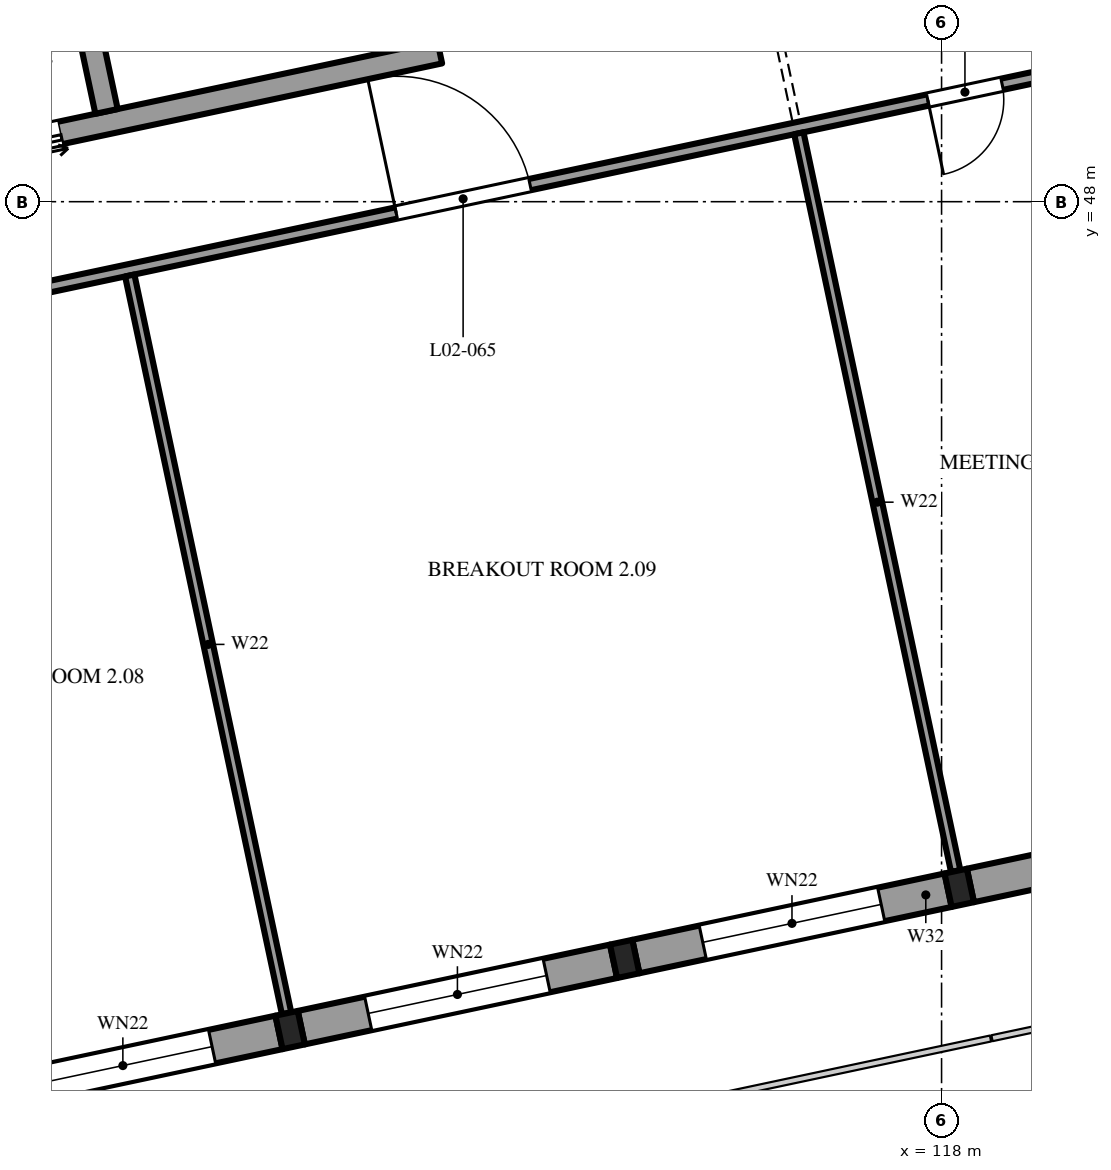
"""IFC4 building model, lengths in metres.
Left out: names, types, materials, properties, quantities, classifications, styles, units other than length and angle.
Written with IfcOpenShell. Run it as: python <this file> out.ifc"""

import sys

from ifc_helpers import new_model, si_unit, direction, frame, frame_2d, origin, origin_2d, place, context, subcontext, project, spatial, rectangle, i_section, extrude, element, fill, save


model = new_model("IFC4")
c1 = context("Model", 3, precision=1e-05, world=origin(), true_north=direction((0.0, 1.0)))
c2 = subcontext(c1, "Body", "Model", "MODEL_VIEW")
j1 = project(units=[si_unit("LENGTHUNIT", "METRE"), si_unit("PLANEANGLEUNIT", "RADIAN")], contexts=[c1])
p1 = place(None, origin())
s1 = spatial("IfcSite", under=j1, at=p1, CompositionType="ELEMENT")
p2 = place(p1, origin())
s2 = spatial("IfcBuilding", under=s1, at=p2, CompositionType="ELEMENT")
p3 = place(p2, frame((0.0, 0.0, 12.0)))
s3 = spatial("IfcBuildingStorey", under=s2, at=p3, CompositionType="ELEMENT", Elevation=12.0)
for number, where, z_axis, x_axis in (
    (1, (109.429, 37.101, 0.0), (0.0, 0.0, 1.0), (0.978, 0.208, 0.0)),
    (2, (113.831, 38.036, 0.0), (0.0, 0.0, 1.0), (0.978, 0.208, 0.0)),
    (3, (118.233, 38.972, 0.0), (0.0, 0.0, 1.0), (0.978, 0.208, 0.0)),
):
    element("IfcColumn", number, at=place(p3, frame(where, z_axis=z_axis, x_axis=x_axis)), inside=s3, PredefinedType="COLUMN", context=c2, shape_type="SweptSolid", body=[
        extrude(i_section(OverallWidth=0.3, OverallDepth=0.45, WebThickness=0.014, FlangeThickness=0.026, FilletRadius=0.027, at=origin_2d()), origin(), (0.0, 0.0, 1.0), 4.8),
    ])
p4 = place(p3, frame((97.997, 47.118, 0.0), z_axis=(0.0, 0.0, 1.0), x_axis=(0.978147662755, 0.20791139903, 0.0)))
e4 = element("IfcWall", 4, at=p4, inside=s3, PredefinedType="SHEAR", context=c2, shape_type="SweptSolid", body=[
    extrude(rectangle(XDim=13.7, YDim=0.3, at=frame_2d((6.85, 0.0))), origin(), (0.0, 0.0, 1.0), 4.8),
])
p5 = place(p4, frame((5.1, 0.0, 0.0)))
e5 = element("IfcOpeningElement", 5, at=p5, cuts=e4, PredefinedType="OPENING", context=c2, shape_type="SweptSolid", body=[
    extrude(rectangle(XDim=1.1, YDim=2.1, at=frame_2d((0.55, 1.05))), frame((0.0, 0.16, 0.0), z_axis=(0.0, -1.0, 0.0), x_axis=(1.0, 0.0, 0.0)), (0.0, 0.0, 1.0), 0.32),
])
p6 = place(p4, frame((7.5, 0.0, 0.0)))
e6 = element("IfcOpeningElement", 6, at=p6, cuts=e4, PredefinedType="OPENING", context=c2, shape_type="SweptSolid", body=[
    extrude(rectangle(XDim=1.1, YDim=2.1, at=frame_2d((0.55, 1.05))), frame((0.0, 0.16, 0.0), z_axis=(0.0, -1.0, 0.0), x_axis=(1.0, 0.0, 0.0)), (0.0, 0.0, 1.0), 0.32),
])
p7 = place(p3, frame((105.35, 57.013, 0.0), z_axis=(0.0, 0.0, 1.0), x_axis=(0.207915693476, -0.978146749934, 0.0)))
e7 = element("IfcWall", 7, at=p7, inside=s3, PredefinedType="SHEAR", context=c2, shape_type="SweptSolid", body=[
    extrude(rectangle(XDim=8.0, YDim=0.3, at=frame_2d((4.0, 0.0))), origin(), (0.0, 0.0, 1.0), 4.8),
])
p8 = place(p3, frame((105.174, 36.197, 0.0), z_axis=(0.0, 0.0, 1.0), x_axis=(0.978155748334, 0.207873355681, 0.0)))
e8 = element("IfcWall", 8, at=p8, inside=s3, PredefinedType="SOLIDWALL", context=c2, shape_type="SweptSolid", body=[
    extrude(rectangle(XDim=4.2, YDim=0.45, at=frame_2d((2.1, 0.0))), origin(), (0.0, 0.0, 1.0), 4.35),
])
p9 = place(p8, frame((0.9, 0.0, 0.9)))
e9 = element("IfcOpeningElement", 9, at=p9, cuts=e8, PredefinedType="OPENING", context=c2, shape_type="SweptSolid", body=[
    extrude(rectangle(XDim=2.4, YDim=2.4, at=frame_2d((1.2, 1.2))), frame((0.0, 0.235, 0.0), z_axis=(0.0, -1.0, 0.0), x_axis=(1.0, 0.0, 0.0)), (0.0, 0.0, 1.0), 0.47),
])
p10 = place(p3, frame((109.576, 37.132, 0.0), z_axis=(0.0, 0.0, 1.0), x_axis=(0.978146440129, 0.207917150959, 0.0)))
e10 = element("IfcWall", 10, at=p10, inside=s3, PredefinedType="SOLIDWALL", context=c2, shape_type="SweptSolid", body=[
    extrude(rectangle(XDim=4.2, YDim=0.45, at=frame_2d((2.1, 0.0))), origin(), (0.0, 0.0, 1.0), 4.35),
])
p11 = place(p10, frame((0.9, 0.0, 0.9)))
e11 = element("IfcOpeningElement", 11, at=p11, cuts=e10, PredefinedType="OPENING", context=c2, shape_type="SweptSolid", body=[
    extrude(rectangle(XDim=2.4, YDim=2.4, at=frame_2d((1.2, 1.2))), frame((0.0, 0.235, 0.0), z_axis=(0.0, -1.0, 0.0), x_axis=(1.0, 0.0, 0.0)), (0.0, 0.0, 1.0), 0.47),
])
p12 = place(p3, frame((113.978, 38.068, 0.0), z_axis=(0.0, 0.0, 1.0), x_axis=(0.978143927149, 0.207928972925, 0.0)))
e12 = element("IfcWall", 12, at=p12, inside=s3, PredefinedType="SOLIDWALL", context=c2, shape_type="SweptSolid", body=[
    extrude(rectangle(XDim=4.2, YDim=0.45, at=frame_2d((2.1, 0.0))), origin(), (0.0, 0.0, 1.0), 4.35),
])
p13 = place(p12, frame((0.9, 0.0, 0.9)))
e13 = element("IfcOpeningElement", 13, at=p13, cuts=e12, PredefinedType="OPENING", context=c2, shape_type="SweptSolid", body=[
    extrude(rectangle(XDim=2.4, YDim=2.4, at=frame_2d((1.2, 1.2))), frame((0.0, 0.235, 0.0), z_axis=(0.0, -1.0, 0.0), x_axis=(1.0, 0.0, 0.0)), (0.0, 0.0, 1.0), 0.47),
])
p14 = place(p3, frame((118.379, 39.003, 0.0), z_axis=(0.0, 0.0, 1.0), x_axis=(0.978143927149, 0.207928972925, 0.0)))
e14 = element("IfcWall", 14, at=p14, inside=s3, PredefinedType="SOLIDWALL", context=c2, shape_type="SweptSolid", body=[
    extrude(rectangle(XDim=4.2, YDim=0.45, at=frame_2d((2.1, 0.0))), origin(), (0.0, 0.0, 1.0), 4.35),
])
p15 = place(p14, frame((0.9, 0.0, 0.9)))
e15 = element("IfcOpeningElement", 15, at=p15, cuts=e14, PredefinedType="OPENING", context=c2, shape_type="SweptSolid", body=[
    extrude(rectangle(XDim=2.4, YDim=2.4, at=frame_2d((1.2, 1.2))), frame((0.0, 0.235, 0.0), z_axis=(0.0, -1.0, 0.0), x_axis=(1.0, 0.0, 0.0)), (0.0, 0.0, 1.0), 0.47),
])
p16 = place(p3, frame((80.893, 41.489, 0.0), z_axis=(0.0, 0.0, 1.0), x_axis=(0.978147680869, 0.207911313813, 0.0)))
e16 = element("IfcWall", 16, at=p16, inside=s3, PredefinedType="PARTITIONING", context=c2, shape_type="SweptSolid", body=[
    extrude(rectangle(XDim=40.5, YDim=0.15, at=frame_2d((20.25, 0.0))), origin(), (0.0, 0.0, 1.0), 3.75),
])
p17 = place(p16, frame((1.75, 0.0, 0.0)))
e17 = element("IfcOpeningElement", 17, at=p17, cuts=e16, PredefinedType="OPENING", context=c2, shape_type="SweptSolid", body=[
    extrude(rectangle(XDim=1.0, YDim=2.1, at=frame_2d((0.5, 1.05))), frame((0.0, 0.085, 0.0), z_axis=(0.0, -1.0, 0.0), x_axis=(1.0, 0.0, 0.0)), (0.0, 0.0, 1.0), 0.17),
])
p18 = place(p16, frame((8.1, 0.0, 0.0)))
e18 = element("IfcOpeningElement", 18, at=p18, cuts=e16, PredefinedType="OPENING", context=c2, shape_type="SweptSolid", body=[
    extrude(rectangle(XDim=1.8, YDim=2.1, at=frame_2d((0.9, 1.05))), frame((0.0, 0.085, 0.0), z_axis=(0.0, -1.0, 0.0), x_axis=(1.0, 0.0, 0.0)), (0.0, 0.0, 1.0), 0.17),
])
p19 = place(p16, frame((17.25, 0.0, 0.0)))
e19 = element("IfcOpeningElement", 19, at=p19, cuts=e16, PredefinedType="OPENING", context=c2, shape_type="SweptSolid", body=[
    extrude(rectangle(XDim=1.5, YDim=2.1, at=frame_2d((0.75, 1.05))), frame((0.0, 0.085, 0.0), z_axis=(0.0, -1.0, 0.0), x_axis=(1.0, 0.0, 0.0)), (0.0, 0.0, 1.0), 0.17),
])
p20 = place(p16, frame((24.25, 0.0, 0.0)))
e20 = element("IfcOpeningElement", 20, at=p20, cuts=e16, PredefinedType="OPENING", context=c2, shape_type="SweptSolid", body=[
    extrude(rectangle(XDim=1.0, YDim=2.1, at=frame_2d((0.5, 1.05))), frame((0.0, 0.085, 0.0), z_axis=(0.0, -1.0, 0.0), x_axis=(1.0, 0.0, 0.0)), (0.0, 0.0, 1.0), 0.17),
])
p21 = place(p16, frame((30.6, 0.0, 0.0)))
e21 = element("IfcOpeningElement", 21, at=p21, cuts=e16, PredefinedType="OPENING", context=c2, shape_type="SweptSolid", body=[
    extrude(rectangle(XDim=1.8, YDim=2.1, at=frame_2d((0.9, 1.05))), frame((0.0, 0.085, 0.0), z_axis=(0.0, -1.0, 0.0), x_axis=(1.0, 0.0, 0.0)), (0.0, 0.0, 1.0), 0.17),
])
p22 = place(p16, frame((37.75, 0.0, 0.0)))
e22 = element("IfcOpeningElement", 22, at=p22, cuts=e16, PredefinedType="OPENING", context=c2, shape_type="SweptSolid", body=[
    extrude(rectangle(XDim=1.0, YDim=2.1, at=frame_2d((0.5, 1.05))), frame((0.0, 0.085, 0.0), z_axis=(0.0, -1.0, 0.0), x_axis=(1.0, 0.0, 0.0)), (0.0, 0.0, 1.0), 0.17),
])
p23 = place(p3, frame((109.383, 37.321, 0.0), z_axis=(0.0, 0.0, 1.0), x_axis=(-0.20790935802, 0.978148096582, 0.0)))
e23 = element("IfcWall", 23, at=p23, inside=s3, PredefinedType="PARTITIONING", context=c2, shape_type="SweptSolid", body=[
    extrude(rectangle(XDim=9.925, YDim=0.125, at=frame_2d((4.962, 0.0))), origin(), (0.0, 0.0, 1.0), 3.75),
])
p24 = place(p3, frame((118.186, 39.192, 0.0), z_axis=(0.0, 0.0, 1.0), x_axis=(-0.207904355568, 0.978149159861, 0.0)))
e24 = element("IfcWall", 24, at=p24, inside=s3, PredefinedType="PARTITIONING", context=c2, shape_type="SweptSolid", body=[
    extrude(rectangle(XDim=9.925, YDim=0.125, at=frame_2d((4.962, 0.0))), origin(), (0.0, 0.0, 1.0), 3.75),
])
p25 = place(p9, origin())
e25 = element("IfcWindow", 25, at=p25, inside=s3, PartitioningType="SINGLE_PANEL", PredefinedType="WINDOW", context=c2, shape_type="SweptSolid", body=[
    extrude(rectangle(XDim=2.4, YDim=2.4, at=frame_2d((1.2, 1.2))), frame((0.0, 0.03, 0.0), z_axis=(0.0, -1.0, 0.0), x_axis=(1.0, 0.0, 0.0)), (0.0, 0.0, 1.0), 0.06),
])
fill(e9, e25)
p26 = place(p11, origin())
e26 = element("IfcWindow", 26, at=p26, inside=s3, PartitioningType="SINGLE_PANEL", PredefinedType="WINDOW", context=c2, shape_type="SweptSolid", body=[
    extrude(rectangle(XDim=2.4, YDim=2.4, at=frame_2d((1.2, 1.2))), frame((0.0, 0.03, 0.0), z_axis=(0.0, -1.0, 0.0), x_axis=(1.0, 0.0, 0.0)), (0.0, 0.0, 1.0), 0.06),
])
fill(e11, e26)
p27 = place(p13, origin())
e27 = element("IfcWindow", 27, at=p27, inside=s3, PartitioningType="SINGLE_PANEL", PredefinedType="WINDOW", context=c2, shape_type="SweptSolid", body=[
    extrude(rectangle(XDim=2.4, YDim=2.4, at=frame_2d((1.2, 1.2))), frame((0.0, 0.03, 0.0), z_axis=(0.0, -1.0, 0.0), x_axis=(1.0, 0.0, 0.0)), (0.0, 0.0, 1.0), 0.06),
])
fill(e13, e27)
p28 = place(p6, frame((1.1, 0.0, 0.0), z_axis=(0.0, 0.0, 1.0), x_axis=(-1.0, 0.0, 0.0)))
e28 = element("IfcDoor", 28, at=p28, inside=s3, OperationType="DOUBLE_DOOR_SLIDING", PredefinedType="DOOR", context=c2, shape_type="SweptSolid", body=[
    extrude(rectangle(XDim=1.1, YDim=2.1, at=frame_2d((0.55, 1.05))), frame((0.0, 0.025, 0.0), z_axis=(0.0, -1.0, 0.0), x_axis=(1.0, 0.0, 0.0)), (0.0, 0.0, 1.0), 0.05),
])
fill(e6, e28)
p29 = place(p21, origin())
e29 = element("IfcDoor", 29, at=p29, inside=s3, OperationType="DOUBLE_DOOR_SINGLE_SWING", PredefinedType="DOOR", context=c2, shape_type="SweptSolid", body=[
    extrude(rectangle(XDim=1.8, YDim=2.1, at=frame_2d((0.9, 1.05))), frame((0.0, 0.025, 0.0), z_axis=(0.0, -1.0, 0.0), x_axis=(1.0, 0.0, 0.0)), (0.0, 0.0, 1.0), 0.05),
])
fill(e21, e29)
p30 = place(p22, frame((1.0, 0.0, 0.0), z_axis=(0.0, 0.0, 1.0), x_axis=(-1.0, 0.0, 0.0)))
e30 = element("IfcDoor", 30, at=p30, inside=s3, OperationType="SINGLE_SWING_RIGHT", PredefinedType="DOOR", context=c2, shape_type="SweptSolid", body=[
    extrude(rectangle(XDim=1.0, YDim=2.1, at=frame_2d((0.5, 1.05))), frame((0.0, 0.025, 0.0), z_axis=(0.0, -1.0, 0.0), x_axis=(1.0, 0.0, 0.0)), (0.0, 0.0, 1.0), 0.05),
])
fill(e22, e30)
save(model, sys.argv[1])
